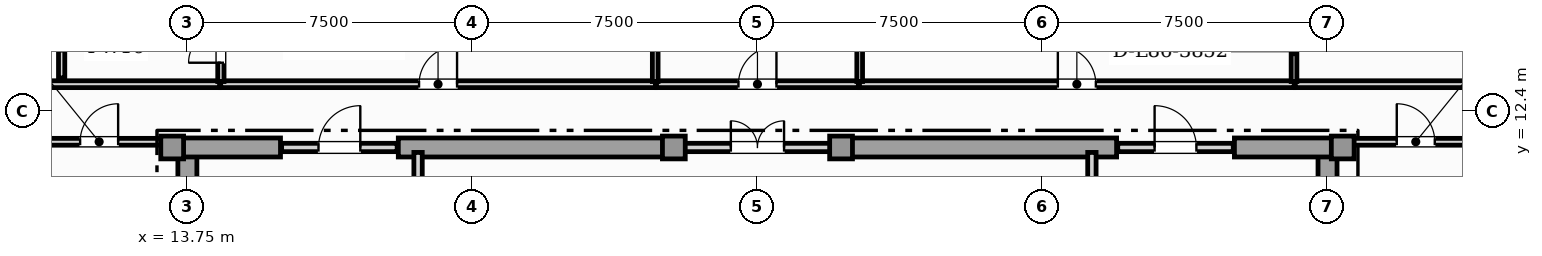
"""IFC4 building model, lengths in metres.
Left out: names, types, materials, properties, quantities, classifications, styles, units other than length and angle.
Written with IfcOpenShell. Run it as: python <this file> out.ifc"""

import sys

from ifc_helpers import new_model, si_unit, direction, frame, frame_2d, origin, origin_2d, place, context, subcontext, project, spatial, rectangle, extrude, element, fill, save


model = new_model("IFC4")
c1 = context("Model", 3, precision=1e-05, world=origin(), true_north=direction((0.0, 1.0)))
c2 = subcontext(c1, "Body", "Model", "MODEL_VIEW")
j1 = project(units=[si_unit("LENGTHUNIT", "METRE"), si_unit("PLANEANGLEUNIT", "RADIAN")], contexts=[c1])
p1 = place(None, origin())
s1 = spatial("IfcSite", under=j1, at=p1, CompositionType="ELEMENT")
p2 = place(p1, origin())
s2 = spatial("IfcBuilding", under=s1, at=p2, CompositionType="ELEMENT")
p3 = place(p2, frame((0.0, 0.0, 349.05)))
s3 = spatial("IfcBuildingStorey", under=s2, at=p3, CompositionType="ELEMENT", Elevation=349.05)
for number, where, z_axis, x_axis in (
    (1, (13.75, 0.92, 0.0), (0.0, 0.0, 1.0), (0.0, 1.0, 0.0)),
    (2, (43.75, 0.92, 0.0), (0.0, 0.0, 1.0), (0.0, 1.0, 0.0)),
):
    element("IfcWall", number, at=place(p3, frame(where, z_axis=z_axis, x_axis=x_axis)), inside=s3, PredefinedType="SHEAR", context=c2, shape_type="SweptSolid", body=[
        extrude(rectangle(XDim=10.53, YDim=0.5, at=frame_2d((5.265, 0.0))), origin(), (0.0, 0.0, 1.0), 4.14),
    ])
p4 = place(p3, frame((13.25, 11.45, 0.0), z_axis=(0.0, 0.0, 1.0), x_axis=(1.0, 0.0, 0.0)))
e3 = element("IfcWall", 3, at=p4, inside=s3, PredefinedType="SHEAR", context=c2, shape_type="SweptSolid", body=[
    extrude(rectangle(XDim=2.95, YDim=0.5, at=frame_2d((1.475, 0.0))), origin(), (0.0, 0.0, 1.0), 4.14),
])
for number, where, z_axis, x_axis in (
    (4, (19.3, 11.45, 0.0), (0.0, 0.0, 1.0), (1.0, 0.0, 0.0)),
    (5, (30.9, 11.45, 0.0), (0.0, 0.0, 1.0), (1.0, 0.0, 0.0)),
):
    element("IfcWall", number, at=place(p3, frame(where, z_axis=z_axis, x_axis=x_axis)), inside=s3, PredefinedType="SHEAR", context=c2, shape_type="SweptSolid", body=[
        extrude(rectangle(XDim=7.3, YDim=0.5, at=frame_2d((3.65, 0.0))), origin(), (0.0, 0.0, 1.0), 4.14),
    ])
p5 = place(p3, frame((41.3, 11.45, 0.0), z_axis=(0.0, 0.0, 1.0), x_axis=(1.0, 0.0, 0.0)))
e6 = element("IfcWall", 6, at=p5, inside=s3, PredefinedType="SHEAR", context=c2, shape_type="SweptSolid", body=[
    extrude(rectangle(XDim=2.95, YDim=0.5, at=frame_2d((1.475, 0.0))), origin(), (0.0, 0.0, 1.0), 4.14),
])
for number, where, z_axis, x_axis in (
    (7, (13.35, 11.45, 0.0), (0.0, 0.0, 1.0), (1.0, 0.0, 0.0)),
    (8, (44.15, 11.45, 0.0), (0.0, 0.0, 1.0), (1.0, 0.0, 0.0)),
    (9, (26.55, 11.45, 0.0), (0.0, 0.0, 1.0), (1.0, 0.0, 0.0)),
    (10, (30.95, 11.45, 0.0), (0.0, 0.0, 1.0), (1.0, 0.0, 0.0)),
):
    element("IfcColumn", number, at=place(p3, frame(where, z_axis=z_axis, x_axis=x_axis)), inside=s3, PredefinedType="COLUMN", context=c2, shape_type="SweptSolid", body=[
        extrude(rectangle(XDim=0.6, YDim=0.6, at=origin_2d()), origin(), (0.0, 0.0, 1.0), 4.4),
    ])
p6 = place(p3, frame((19.82, 8.52, 0.0), z_axis=(0.0, 0.0, 1.0), x_axis=(0.0, 1.0, 0.0)))
e11 = element("IfcWall", 11, at=p6, inside=s3, PredefinedType="SOLIDWALL", context=c2, shape_type="SweptSolid", body=[
    extrude(rectangle(XDim=2.8, YDim=0.22, at=frame_2d((1.4, 0.0))), origin(), (0.0, 0.0, 1.0), 3.595),
])
p7 = place(p6, frame((0.85, 0.0, 0.0)))
e12 = element("IfcOpeningElement", 12, at=p7, cuts=e11, PredefinedType="OPENING", context=c2, shape_type="SweptSolid", body=[
    extrude(rectangle(XDim=1.1, YDim=2.2, at=frame_2d((0.55, 1.1))), frame((0.0, 0.12, 0.0), z_axis=(0.0, -1.0, 0.0), x_axis=(1.0, 0.0, 0.0)), (0.0, 0.0, 1.0), 0.24),
])
p8 = place(p3, frame((37.55, 8.52, 0.0), z_axis=(0.0, 0.0, 1.0), x_axis=(0.0, 1.0, 0.0)))
e13 = element("IfcWall", 13, at=p8, inside=s3, PredefinedType="SOLIDWALL", context=c2, shape_type="SweptSolid", body=[
    extrude(rectangle(XDim=2.8, YDim=0.22, at=frame_2d((1.4, 0.0))), origin(), (0.0, 0.0, 1.0), 3.595),
])
p9 = place(p8, frame((0.85, 0.0, 0.0)))
e14 = element("IfcOpeningElement", 14, at=p9, cuts=e13, PredefinedType="OPENING", context=c2, shape_type="SweptSolid", body=[
    extrude(rectangle(XDim=1.1, YDim=2.2, at=frame_2d((0.55, 1.1))), frame((0.0, 0.12, 0.0), z_axis=(0.0, -1.0, 0.0), x_axis=(1.0, 0.0, 0.0)), (0.0, 0.0, 1.0), 0.24),
])
p10 = place(p3, frame((16.23, 11.45, 0.0), z_axis=(0.0, 0.0, 1.0), x_axis=(1.0, 0.0, 0.0)))
e15 = element("IfcWall", 15, at=p10, inside=s3, PredefinedType="SOLIDWALL", context=c2, shape_type="SweptSolid", body=[
    extrude(rectangle(XDim=3.04, YDim=0.22, at=frame_2d((1.52, 0.0))), origin(), (0.0, 0.0, 1.0), 4.14),
])
p11 = place(p10, frame((0.97, 0.0, 0.0)))
e16 = element("IfcOpeningElement", 16, at=p11, cuts=e15, PredefinedType="OPENING", context=c2, shape_type="SweptSolid", body=[
    extrude(rectangle(XDim=1.1, YDim=2.2, at=frame_2d((0.55, 1.1))), frame((0.0, 0.12, 0.0), z_axis=(0.0, -1.0, 0.0), x_axis=(1.0, 0.0, 0.0)), (0.0, 0.0, 1.0), 0.24),
])
p12 = place(p3, frame((26.63, 11.45, 0.0), z_axis=(0.0, 0.0, 1.0), x_axis=(1.0, 0.0, 0.0)))
e17 = element("IfcWall", 17, at=p12, inside=s3, PredefinedType="SOLIDWALL", context=c2, shape_type="SweptSolid", body=[
    extrude(rectangle(XDim=4.24, YDim=0.22, at=frame_2d((2.12, 0.0))), origin(), (0.0, 0.0, 1.0), 4.14),
])
p13 = place(p12, frame((1.42, 0.0, 0.0)))
e18 = element("IfcOpeningElement", 18, at=p13, cuts=e17, PredefinedType="OPENING", context=c2, shape_type="SweptSolid", body=[
    extrude(rectangle(XDim=1.4, YDim=2.2, at=frame_2d((0.7, 1.1))), frame((0.0, 0.12, 0.0), z_axis=(0.0, -1.0, 0.0), x_axis=(1.0, 0.0, 0.0)), (0.0, 0.0, 1.0), 0.24),
])
p14 = place(p3, frame((38.23, 11.45, 0.0), z_axis=(0.0, 0.0, 1.0), x_axis=(1.0, 0.0, 0.0)))
e19 = element("IfcWall", 19, at=p14, inside=s3, PredefinedType="SOLIDWALL", context=c2, shape_type="SweptSolid", body=[
    extrude(rectangle(XDim=3.04, YDim=0.22, at=frame_2d((1.52, 0.0))), origin(), (0.0, 0.0, 1.0), 4.14),
])
p15 = place(p14, frame((0.97, 0.0, 0.0)))
e20 = element("IfcOpeningElement", 20, at=p15, cuts=e19, PredefinedType="OPENING", context=c2, shape_type="SweptSolid", body=[
    extrude(rectangle(XDim=1.1, YDim=2.2, at=frame_2d((0.55, 1.1))), frame((0.0, 0.12, 0.0), z_axis=(0.0, -1.0, 0.0), x_axis=(1.0, 0.0, 0.0)), (0.0, 0.0, 1.0), 0.24),
])
p16 = place(p3, frame((9.711, 11.6, 0.0), z_axis=(0.0, 0.0, 1.0), x_axis=(1.0, 0.0, 0.0)))
e21 = element("IfcWall", 21, at=p16, inside=s3, PredefinedType="PARTITIONING", context=c2, shape_type="SweptSolid", body=[
    extrude(rectangle(XDim=3.434, YDim=0.18, at=frame_2d((1.717, 0.0))), origin(), (0.0, 0.0, 1.0), 4.14),
])
p17 = place(p16, frame((1.217, 0.0, 0.0)))
e22 = element("IfcOpeningElement", 22, at=p17, cuts=e21, PredefinedType="OPENING", context=c2, shape_type="SweptSolid", body=[
    extrude(rectangle(XDim=1.0, YDim=2.15, at=frame_2d((0.5, 1.075))), frame((0.0, 0.1, 0.0), z_axis=(0.0, -1.0, 0.0), x_axis=(1.0, 0.0, 0.0)), (0.0, 0.0, 1.0), 0.2),
])
p18 = place(p3, frame((44.355, 11.6, 0.0), z_axis=(0.0, 0.0, 1.0), x_axis=(1.0, 0.0, 0.0)))
e23 = element("IfcWall", 23, at=p18, inside=s3, PredefinedType="PARTITIONING", context=c2, shape_type="SweptSolid", body=[
    extrude(rectangle(XDim=3.434, YDim=0.18, at=frame_2d((1.717, 0.0))), origin(), (0.0, 0.0, 1.0), 4.14),
])
p19 = place(p18, frame((1.217, 0.0, 0.0)))
e24 = element("IfcOpeningElement", 24, at=p19, cuts=e23, PredefinedType="OPENING", context=c2, shape_type="SweptSolid", body=[
    extrude(rectangle(XDim=1.0, YDim=2.15, at=frame_2d((0.5, 1.075))), frame((0.0, 0.1, 0.0), z_axis=(0.0, -1.0, 0.0), x_axis=(1.0, 0.0, 0.0)), (0.0, 0.0, 1.0), 0.2),
])
p20 = place(p3, frame((14.627, 13.115, 0.0), z_axis=(0.0, 0.0, 1.0), x_axis=(1.0, 0.0, 0.0)))
e25 = element("IfcWall", 25, at=p20, inside=s3, PredefinedType="PARTITIONING", context=c2, shape_type="SweptSolid", body=[
    extrude(rectangle(XDim=11.438, YDim=0.18, at=frame_2d((5.719, 0.0))), origin(), (0.0, 0.0, 1.0), 4.14),
])
p21 = place(p20, frame((5.219, 0.0, 0.0)))
e26 = element("IfcOpeningElement", 26, at=p21, cuts=e25, PredefinedType="OPENING", context=c2, shape_type="SweptSolid", body=[
    extrude(rectangle(XDim=1.0, YDim=2.15, at=frame_2d((0.5, 1.075))), frame((0.0, 0.1, 0.0), z_axis=(0.0, -1.0, 0.0), x_axis=(1.0, 0.0, 0.0)), (0.0, 0.0, 1.0), 0.2),
])
p22 = place(p3, frame((31.435, 13.115, 0.0), z_axis=(0.0, 0.0, 1.0), x_axis=(1.0, 0.0, 0.0)))
e27 = element("IfcWall", 27, at=p22, inside=s3, PredefinedType="PARTITIONING", context=c2, shape_type="SweptSolid", body=[
    extrude(rectangle(XDim=11.438, YDim=0.18, at=frame_2d((5.719, 0.0))), origin(), (0.0, 0.0, 1.0), 4.14),
])
p23 = place(p22, frame((5.219, 0.0, 0.0)))
e28 = element("IfcOpeningElement", 28, at=p23, cuts=e27, PredefinedType="OPENING", context=c2, shape_type="SweptSolid", body=[
    extrude(rectangle(XDim=1.0, YDim=2.15, at=frame_2d((0.5, 1.075))), frame((0.0, 0.1, 0.0), z_axis=(0.0, -1.0, 0.0), x_axis=(1.0, 0.0, 0.0)), (0.0, 0.0, 1.0), 0.2),
])
p24 = place(p3, frame((26.095, 13.115, 0.0), z_axis=(0.0, 0.0, 1.0), x_axis=(1.0, 0.0, 0.0)))
e29 = element("IfcWall", 29, at=p24, inside=s3, PredefinedType="PARTITIONING", context=c2, shape_type="SweptSolid", body=[
    extrude(rectangle(XDim=5.31, YDim=0.18, at=frame_2d((2.655, 0.0))), origin(), (0.0, 0.0, 1.0), 4.14),
])
p25 = place(p24, frame((2.155, 0.0, 0.0)))
e30 = element("IfcOpeningElement", 30, at=p25, cuts=e29, PredefinedType="OPENING", context=c2, shape_type="SweptSolid", body=[
    extrude(rectangle(XDim=1.0, YDim=2.15, at=frame_2d((0.5, 1.075))), frame((0.0, 0.1, 0.0), z_axis=(0.0, -1.0, 0.0), x_axis=(1.0, 0.0, 0.0)), (0.0, 0.0, 1.0), 0.2),
])
for number, where, z_axis, x_axis in (
    (31, (9.711, 13.115, 0.0), (0.0, 0.0, 1.0), (1.0, 0.0, 0.0)),
    (32, (42.903, 13.115, 0.0), (0.0, 0.0, 1.0), (1.0, 0.0, 0.0)),
):
    element("IfcWall", number, at=place(p3, frame(where, z_axis=z_axis, x_axis=x_axis)), inside=s3, PredefinedType="PARTITIONING", context=c2, shape_type="SweptSolid", body=[
        extrude(rectangle(XDim=4.885, YDim=0.18, at=frame_2d((2.443, 0.0))), origin(), (0.0, 0.0, 1.0), 4.14),
    ])
p26 = place(p3, frame((26.06, 13.185, 0.0), z_axis=(0.0, 0.0, 1.0), x_axis=(0.0, 1.0, 0.0)))
e33 = element("IfcWall", 33, at=p26, inside=s3, PredefinedType="PARTITIONING", context=c2, shape_type="SweptSolid", body=[
    extrude(rectangle(XDim=7.185, YDim=0.15, at=frame_2d((3.593, 0.0))), origin(), (0.0, 0.0, 1.0), 4.14),
])
p27 = place(p26, frame((3.133, 0.0, 0.0)))
e34 = element("IfcOpeningElement", 34, at=p27, cuts=e33, PredefinedType="OPENING", context=c2, shape_type="SweptSolid", body=[
    extrude(rectangle(XDim=0.92, YDim=2.1, at=frame_2d((0.46, 1.05))), frame((0.0, 0.085, 0.0), z_axis=(0.0, -1.0, 0.0), x_axis=(1.0, 0.0, 0.0)), (0.0, 0.0, 1.0), 0.17),
])
p28 = place(p3, frame((14.632, 13.185, 0.0), z_axis=(0.0, 0.0, 1.0), x_axis=(0.0, 1.0, 0.0)))
e35 = element("IfcWall", 35, at=p28, inside=s3, PredefinedType="PLUMBINGWALL", context=c2, shape_type="SweptSolid", body=[
    extrude(rectangle(XDim=1.84, YDim=0.165, at=frame_2d((0.92, 0.0))), origin(), (0.0, 0.0, 1.0), 4.14),
])
p29 = place(p28, frame((0.495, 0.0, 0.0)))
e36 = element("IfcOpeningElement", 36, at=p29, cuts=e35, PredefinedType="OPENING", context=c2, shape_type="SweptSolid", body=[
    extrude(rectangle(XDim=0.85, YDim=2.1, at=frame_2d((0.425, 1.05))), frame((0.0, 0.093, 0.0), z_axis=(0.0, -1.0, 0.0), x_axis=(1.0, 0.0, 0.0)), (0.0, 0.0, 1.0), 0.185),
])
p30 = place(p3, frame((31.44, 13.185, 0.0), z_axis=(0.0, 0.0, 1.0), x_axis=(0.0, 1.0, 0.0)))
e37 = element("IfcWall", 37, at=p30, inside=s3, PredefinedType="PARTITIONING", context=c2, shape_type="SweptSolid", body=[
    extrude(rectangle(XDim=7.185, YDim=0.15, at=frame_2d((3.593, 0.0))), origin(), (0.0, 0.0, 1.0), 4.14),
])
p31 = place(p30, frame((3.133, 0.0, 0.0)))
e38 = element("IfcOpeningElement", 38, at=p31, cuts=e37, PredefinedType="OPENING", context=c2, shape_type="SweptSolid", body=[
    extrude(rectangle(XDim=0.92, YDim=2.1, at=frame_2d((0.46, 1.05))), frame((0.0, 0.085, 0.0), z_axis=(0.0, -1.0, 0.0), x_axis=(1.0, 0.0, 0.0)), (0.0, 0.0, 1.0), 0.17),
])
p32 = place(p3, frame((42.868, 13.185, 0.0), z_axis=(0.0, 0.0, 1.0), x_axis=(0.0, 1.0, 0.0)))
e39 = element("IfcWall", 39, at=p32, inside=s3, PredefinedType="PARTITIONING", context=c2, shape_type="SweptSolid", body=[
    extrude(rectangle(XDim=2.531, YDim=0.15, at=frame_2d((1.266, 0.0))), origin(), (0.0, 0.0, 1.0), 4.14),
])
p33 = place(p32, frame((0.806, 0.0, 0.0)))
e40 = element("IfcOpeningElement", 40, at=p33, cuts=e39, PredefinedType="OPENING", context=c2, shape_type="SweptSolid", body=[
    extrude(rectangle(XDim=0.92, YDim=2.1, at=frame_2d((0.46, 1.05))), frame((0.0, 0.085, 0.0), z_axis=(0.0, -1.0, 0.0), x_axis=(1.0, 0.0, 0.0)), (0.0, 0.0, 1.0), 0.17),
])
p34 = place(p3, frame((10.442, 13.28, 0.0), z_axis=(0.0, 0.0, 1.0), x_axis=(0.0, 1.0, 0.0)))
e41 = element("IfcWall", 41, at=p34, inside=s3, PredefinedType="PLUMBINGWALL", context=c2, shape_type="SweptSolid", body=[
    extrude(rectangle(XDim=1.575, YDim=0.165, at=frame_2d((0.788, 0.0))), origin(), (0.0, 0.0, 1.0), 4.14),
])
p35 = place(p11, origin())
e42 = element("IfcDoor", 42, at=p35, inside=s3, OperationType="SINGLE_SWING_RIGHT", PredefinedType="DOOR", context=c2, shape_type="SweptSolid", body=[
    extrude(rectangle(XDim=1.1, YDim=2.2, at=frame_2d((0.55, 1.1))), frame((0.0, 0.025, 0.0), z_axis=(0.0, -1.0, 0.0), x_axis=(1.0, 0.0, 0.0)), (0.0, 0.0, 1.0), 0.05),
])
fill(e16, e42)
p36 = place(p13, origin())
e43 = element("IfcDoor", 43, at=p36, inside=s3, OperationType="DOUBLE_DOOR_SINGLE_SWING", PredefinedType="DOOR", context=c2, shape_type="SweptSolid", body=[
    extrude(rectangle(XDim=1.4, YDim=2.2, at=frame_2d((0.7, 1.1))), frame((0.0, 0.025, 0.0), z_axis=(0.0, -1.0, 0.0), x_axis=(1.0, 0.0, 0.0)), (0.0, 0.0, 1.0), 0.05),
])
fill(e18, e43)
p37 = place(p15, origin())
e44 = element("IfcDoor", 44, at=p37, inside=s3, OperationType="SINGLE_SWING_LEFT", PredefinedType="DOOR", context=c2, shape_type="SweptSolid", body=[
    extrude(rectangle(XDim=1.1, YDim=2.2, at=frame_2d((0.55, 1.1))), frame((0.0, 0.025, 0.0), z_axis=(0.0, -1.0, 0.0), x_axis=(1.0, 0.0, 0.0)), (0.0, 0.0, 1.0), 0.05),
])
fill(e20, e44)
p38 = place(p17, origin())
e45 = element("IfcDoor", 45, at=p38, inside=s3, OperationType="SINGLE_SWING_RIGHT", PredefinedType="DOOR", context=c2, shape_type="SweptSolid", body=[
    extrude(rectangle(XDim=1.0, YDim=2.15, at=frame_2d((0.5, 1.075))), frame((0.0, 0.025, 0.0), z_axis=(0.0, -1.0, 0.0), x_axis=(1.0, 0.0, 0.0)), (0.0, 0.0, 1.0), 0.05),
])
fill(e22, e45)
p39 = place(p19, origin())
e46 = element("IfcDoor", 46, at=p39, inside=s3, OperationType="SINGLE_SWING_LEFT", PredefinedType="DOOR", context=c2, shape_type="SweptSolid", body=[
    extrude(rectangle(XDim=1.0, YDim=2.15, at=frame_2d((0.5, 1.075))), frame((0.0, 0.025, 0.0), z_axis=(0.0, -1.0, 0.0), x_axis=(1.0, 0.0, 0.0)), (0.0, 0.0, 1.0), 0.05),
])
fill(e24, e46)
p40 = place(p21, origin())
e47 = element("IfcDoor", 47, at=p40, inside=s3, OperationType="SINGLE_SWING_RIGHT", PredefinedType="DOOR", context=c2, shape_type="SweptSolid", body=[
    extrude(rectangle(XDim=1.0, YDim=2.15, at=frame_2d((0.5, 1.075))), frame((0.0, 0.025, 0.0), z_axis=(0.0, -1.0, 0.0), x_axis=(1.0, 0.0, 0.0)), (0.0, 0.0, 1.0), 0.05),
])
fill(e26, e47)
p41 = place(p23, origin())
e48 = element("IfcDoor", 48, at=p41, inside=s3, OperationType="SINGLE_SWING_LEFT", PredefinedType="DOOR", context=c2, shape_type="SweptSolid", body=[
    extrude(rectangle(XDim=1.0, YDim=2.15, at=frame_2d((0.5, 1.075))), frame((0.0, 0.025, 0.0), z_axis=(0.0, -1.0, 0.0), x_axis=(1.0, 0.0, 0.0)), (0.0, 0.0, 1.0), 0.05),
])
fill(e28, e48)
p42 = place(p25, origin())
e49 = element("IfcDoor", 49, at=p42, inside=s3, OperationType="SINGLE_SWING_RIGHT", PredefinedType="DOOR", context=c2, shape_type="SweptSolid", body=[
    extrude(rectangle(XDim=1.0, YDim=2.15, at=frame_2d((0.5, 1.075))), frame((0.0, 0.025, 0.0), z_axis=(0.0, -1.0, 0.0), x_axis=(1.0, 0.0, 0.0)), (0.0, 0.0, 1.0), 0.05),
])
fill(e30, e49)
p43 = place(p29, origin())
e50 = element("IfcDoor", 50, at=p43, inside=s3, OperationType="SINGLE_SWING_LEFT", PredefinedType="DOOR", context=c2, shape_type="SweptSolid", body=[
    extrude(rectangle(XDim=0.85, YDim=2.1, at=frame_2d((0.425, 1.05))), frame((0.0, 0.025, 0.0), z_axis=(0.0, -1.0, 0.0), x_axis=(1.0, 0.0, 0.0)), (0.0, 0.0, 1.0), 0.05),
])
fill(e36, e50)
save(model, sys.argv[1])
